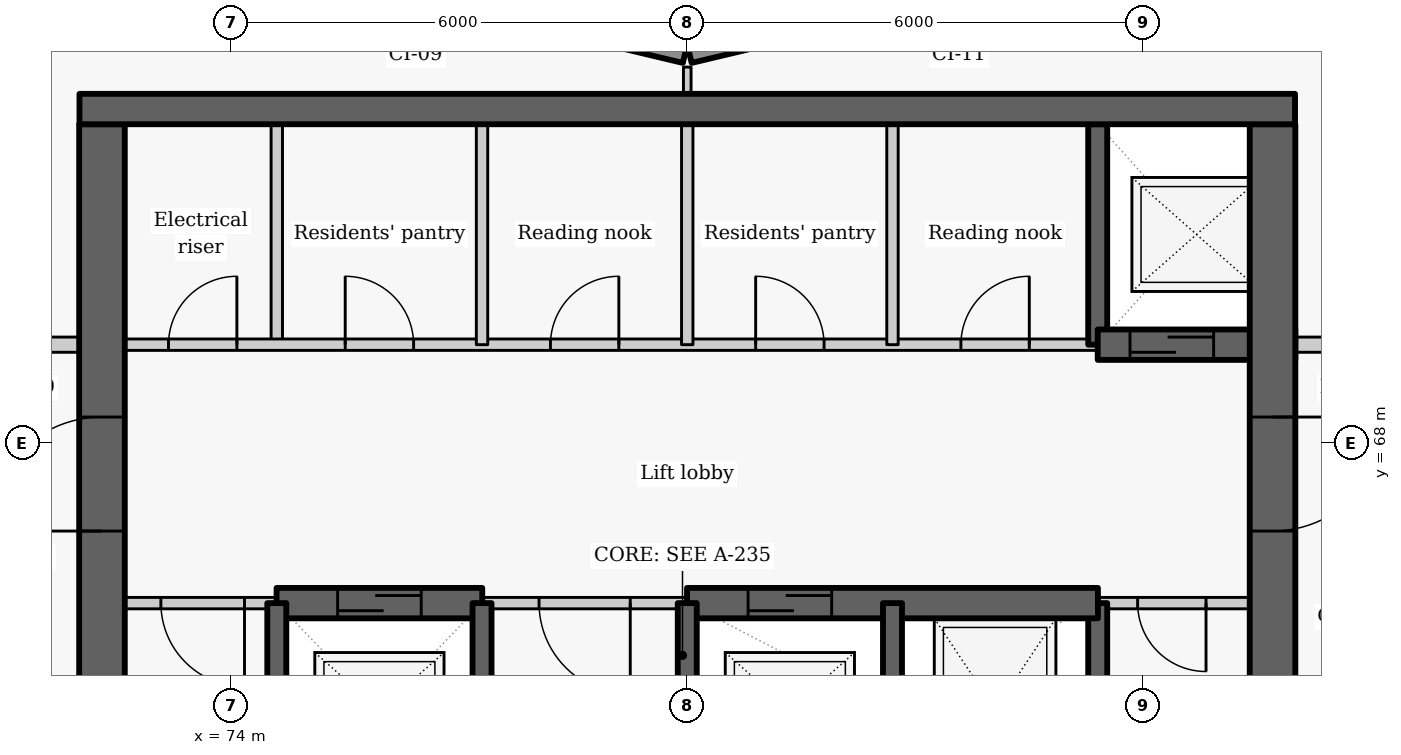
"""IFC4 building model, lengths in metres.
Left out: names, types, materials, properties, quantities, classifications, styles, units other than length and angle.
Written with IfcOpenShell. Run it as: python <this file> out.ifc"""

import sys

from ifc_helpers import new_model, si_unit, direction, frame, frame_2d, origin, place, context, subcontext, project, spatial, rectangle, extrude, element, fill, save


model = new_model("IFC4")
c1 = context("Model", 3, precision=1e-05, world=origin(), true_north=direction((0.0, 1.0)))
c2 = subcontext(c1, "Body", "Model", "MODEL_VIEW")
j1 = project(units=[si_unit("LENGTHUNIT", "METRE"), si_unit("PLANEANGLEUNIT", "RADIAN")], contexts=[c1])
p1 = place(None, origin())
s1 = spatial("IfcSite", under=j1, at=p1, CompositionType="ELEMENT")
p2 = place(p1, origin())
s2 = spatial("IfcBuilding", under=s1, at=p2, CompositionType="ELEMENT")
p3 = place(p2, frame((0.0, 0.0, 203.1)))
s3 = spatial("IfcBuildingStorey", under=s2, at=p3, CompositionType="ELEMENT", Elevation=203.1)
p4 = place(p3, frame((83.186, 73.881, 0.0), z_axis=(0.0, 0.0, 1.0), x_axis=(-0.972773113459, -0.231759508395, 0.0)))
e1 = element("IfcWall", 1, at=p4, inside=s3, PredefinedType="SOLIDWALL", context=c2, shape_type="SweptSolid", body=[
    extrude(rectangle(XDim=3.246, YDim=0.25, at=frame_2d((1.623, 0.0))), origin(), (0.0, 0.0, 1.0), 2.425),
])
p5 = place(p4, frame((0.573, 0.0, 0.9)))
e2 = element("IfcOpeningElement", 2, at=p5, cuts=e1, PredefinedType="OPENING", context=c2, shape_type="SweptSolid", body=[
    extrude(rectangle(XDim=2.1, YDim=1.1, at=frame_2d((1.05, 0.55))), frame((0.0, 0.135, 0.0), z_axis=(0.0, -1.0, 0.0), x_axis=(1.0, 0.0, 0.0)), (0.0, 0.0, 1.0), 0.27),
])
p6 = place(p3, frame((79.971, 73.128, 0.0), z_axis=(0.0, 0.0, 1.0), x_axis=(-0.972773113459, 0.231759508395, 0.0)))
e3 = element("IfcWall", 3, at=p6, inside=s3, PredefinedType="SOLIDWALL", context=c2, shape_type="SweptSolid", body=[
    extrude(rectangle(XDim=3.246, YDim=0.25, at=frame_2d((1.623, 0.0))), origin(), (0.0, 0.0, 1.0), 2.425),
])
p7 = place(p6, frame((0.573, 0.0, 0.9)))
e4 = element("IfcOpeningElement", 4, at=p7, cuts=e3, PredefinedType="OPENING", context=c2, shape_type="SweptSolid", body=[
    extrude(rectangle(XDim=2.1, YDim=1.1, at=frame_2d((1.05, 0.55))), frame((0.0, 0.135, 0.0), z_axis=(0.0, -1.0, 0.0), x_axis=(1.0, 0.0, 0.0)), (0.0, 0.0, 1.0), 0.27),
])
p8 = place(p3, frame((74.6, 69.3, 0.0), z_axis=(0.0, 0.0, 1.0), x_axis=(0.0, 1.0, 0.0)))
e5 = element("IfcWall", 5, at=p8, inside=s3, PredefinedType="PARTITIONING", context=c2, shape_type="SweptSolid", body=[
    extrude(rectangle(XDim=2.9, YDim=0.15, at=frame_2d((1.45, 0.0))), origin(), (0.0, 0.0, 1.0), 3.025),
])
p9 = place(p3, frame((72.0, 69.3, 0.0), z_axis=(0.0, 0.0, 1.0), x_axis=(1.0, 0.0, 0.0)))
e6 = element("IfcWall", 6, at=p9, inside=s3, PredefinedType="PARTITIONING", context=c2, shape_type="SweptSolid", body=[
    extrude(rectangle(XDim=13.4, YDim=0.15, at=frame_2d((6.7, 0.0))), origin(), (0.0, 0.0, 1.0), 3.025),
])
p10 = place(p9, frame((1.175, 0.0, 0.0)))
e7 = element("IfcOpeningElement", 7, at=p10, cuts=e6, PredefinedType="OPENING", context=c2, shape_type="SweptSolid", body=[
    extrude(rectangle(XDim=0.9, YDim=2.1, at=frame_2d((0.45, 1.05))), frame((0.0, 0.085, 0.0), z_axis=(0.0, -1.0, 0.0), x_axis=(1.0, 0.0, 0.0)), (0.0, 0.0, 1.0), 0.17),
])
p11 = place(p9, frame((3.5, 0.0, 0.0)))
e8 = element("IfcOpeningElement", 8, at=p11, cuts=e6, PredefinedType="OPENING", context=c2, shape_type="SweptSolid", body=[
    extrude(rectangle(XDim=0.9, YDim=2.1, at=frame_2d((0.45, 1.05))), frame((0.0, 0.085, 0.0), z_axis=(0.0, -1.0, 0.0), x_axis=(1.0, 0.0, 0.0)), (0.0, 0.0, 1.0), 0.17),
])
p12 = place(p9, frame((6.2, 0.0, 0.0)))
e9 = element("IfcOpeningElement", 9, at=p12, cuts=e6, PredefinedType="OPENING", context=c2, shape_type="SweptSolid", body=[
    extrude(rectangle(XDim=0.9, YDim=2.1, at=frame_2d((0.45, 1.05))), frame((0.0, 0.085, 0.0), z_axis=(0.0, -1.0, 0.0), x_axis=(1.0, 0.0, 0.0)), (0.0, 0.0, 1.0), 0.17),
])
p13 = place(p9, frame((8.9, 0.0, 0.0)))
e10 = element("IfcOpeningElement", 10, at=p13, cuts=e6, PredefinedType="OPENING", context=c2, shape_type="SweptSolid", body=[
    extrude(rectangle(XDim=0.9, YDim=2.1, at=frame_2d((0.45, 1.05))), frame((0.0, 0.085, 0.0), z_axis=(0.0, -1.0, 0.0), x_axis=(1.0, 0.0, 0.0)), (0.0, 0.0, 1.0), 0.17),
])
p14 = place(p9, frame((11.6, 0.0, 0.0)))
e11 = element("IfcOpeningElement", 11, at=p14, cuts=e6, PredefinedType="OPENING", context=c2, shape_type="SweptSolid", body=[
    extrude(rectangle(XDim=0.9, YDim=2.1, at=frame_2d((0.45, 1.05))), frame((0.0, 0.085, 0.0), z_axis=(0.0, -1.0, 0.0), x_axis=(1.0, 0.0, 0.0)), (0.0, 0.0, 1.0), 0.17),
])
p15 = place(p3, frame((72.3, 63.1, -0.275), z_axis=(0.0, 0.0, 1.0), x_axis=(0.0, 1.0, 0.0)))
e12 = element("IfcWall", 12, at=p15, inside=s3, PredefinedType="SHEAR", context=c2, shape_type="SweptSolid", body=[
    extrude(rectangle(XDim=9.1, YDim=0.6, at=frame_2d((4.55, 0.0))), origin(), (0.0, 0.0, 1.0), 3.3),
])
p16 = place(p15, frame((3.748, 0.0, 0.275)))
e13 = element("IfcOpeningElement", 13, at=p16, cuts=e12, PredefinedType="OPENING", context=c2, shape_type="SweptSolid", body=[
    extrude(rectangle(XDim=1.5, YDim=2.1, at=frame_2d((0.75, 1.05))), frame((0.0, 0.31, 0.0), z_axis=(0.0, -1.0, 0.0), x_axis=(1.0, 0.0, 0.0)), (0.0, 0.0, 1.0), 0.62),
])
p17 = place(p3, frame((85.4, 63.1, -0.275), z_axis=(0.0, 0.0, 1.0), x_axis=(0.0, 1.0, 0.0)))
e14 = element("IfcWall", 14, at=p17, inside=s3, PredefinedType="SHEAR", context=c2, shape_type="SweptSolid", body=[
    extrude(rectangle(XDim=2.8, YDim=0.25, at=frame_2d((1.4, 0.0))), origin(), (0.0, 0.0, 1.0), 3.3),
])
p18 = place(p3, frame((85.4, 69.3, -0.275), z_axis=(0.0, 0.0, 1.0), x_axis=(0.0, 1.0, 0.0)))
e15 = element("IfcWall", 15, at=p18, inside=s3, PredefinedType="SHEAR", context=c2, shape_type="SweptSolid", body=[
    extrude(rectangle(XDim=2.9, YDim=0.25, at=frame_2d((1.45, 0.0))), origin(), (0.0, 0.0, 1.0), 3.3),
])
p19 = place(p3, frame((85.4, 69.3, -0.275), z_axis=(0.0, 0.0, 1.0), x_axis=(1.0, 0.0, 0.0)))
e16 = element("IfcWall", 16, at=p19, inside=s3, PredefinedType="SHEAR", context=c2, shape_type="SweptSolid", body=[
    extrude(rectangle(XDim=2.6, YDim=0.4, at=frame_2d((1.3, 0.0))), origin(), (0.0, 0.0, 1.0), 3.3),
])
p20 = place(p19, frame((0.425, 0.0, 0.275)))
e17 = element("IfcOpeningElement", 17, at=p20, cuts=e16, PredefinedType="OPENING", context=c2, shape_type="SweptSolid", body=[
    extrude(rectangle(XDim=1.1, YDim=2.1, at=frame_2d((0.55, 1.05))), frame((0.0, 0.21, 0.0), z_axis=(0.0, -1.0, 0.0), x_axis=(1.0, 0.0, 0.0)), (0.0, 0.0, 1.0), 0.42),
])
p21 = place(p3, frame((87.7, 72.2, -0.275), z_axis=(0.0, 0.0, 1.0), x_axis=(0.0, -1.0, 0.0)))
e18 = element("IfcWall", 18, at=p21, inside=s3, PredefinedType="SHEAR", context=c2, shape_type="SweptSolid", body=[
    extrude(rectangle(XDim=14.25, YDim=0.6, at=frame_2d((7.125, 0.0))), origin(), (0.0, 0.0, 1.0), 3.3),
])
p22 = place(p21, frame((3.852, 0.0, 0.275)))
e19 = element("IfcOpeningElement", 19, at=p22, cuts=e18, PredefinedType="OPENING", context=c2, shape_type="SweptSolid", body=[
    extrude(rectangle(XDim=1.5, YDim=2.1, at=frame_2d((0.75, 1.05))), frame((0.0, 0.31, 0.0), z_axis=(0.0, -1.0, 0.0), x_axis=(1.0, 0.0, 0.0)), (0.0, 0.0, 1.0), 0.62),
])
for number, where, z_axis, x_axis in (
    (20, (77.3, 69.3, 0.0), (0.0, 0.0, 1.0), (0.0, 1.0, 0.0)),
    (21, (80.0, 69.3, 0.0), (0.0, 0.0, 1.0), (0.0, 1.0, 0.0)),
    (22, (82.7, 69.3, 0.0), (0.0, 0.0, 1.0), (0.0, 1.0, 0.0)),
):
    element("IfcWall", number, at=place(p3, frame(where, z_axis=z_axis, x_axis=x_axis)), inside=s3, PredefinedType="PARTITIONING", context=c2, shape_type="SweptSolid", body=[
        extrude(rectangle(XDim=2.9, YDim=0.15, at=frame_2d((1.45, 0.0))), origin(), (0.0, 0.0, 1.0), 3.025),
    ])
p23 = place(p3, frame((74.603, 65.9, 0.0), z_axis=(0.0, 0.0, 1.0), x_axis=(-1.0, 0.0, 0.0)))
e23 = element("IfcWall", 23, at=p23, inside=s3, PredefinedType="PARTITIONING", context=c2, shape_type="SweptSolid", body=[
    extrude(rectangle(XDim=2.603, YDim=0.15, at=frame_2d((1.302, 0.0))), origin(), (0.0, 0.0, 1.0), 3.025),
])
p24 = place(p23, frame((0.428, 0.0, 0.0)))
e24 = element("IfcOpeningElement", 24, at=p24, cuts=e23, PredefinedType="OPENING", context=c2, shape_type="SweptSolid", body=[
    extrude(rectangle(XDim=1.1, YDim=2.1, at=frame_2d((0.55, 1.05))), frame((0.0, 0.085, 0.0), z_axis=(0.0, -1.0, 0.0), x_axis=(1.0, 0.0, 0.0)), (0.0, 0.0, 1.0), 0.17),
])
p25 = place(p3, frame((80.003, 65.9, 0.0), z_axis=(0.0, 0.0, 1.0), x_axis=(-1.0, 0.0, 0.0)))
e25 = element("IfcWall", 25, at=p25, inside=s3, PredefinedType="PARTITIONING", context=c2, shape_type="SweptSolid", body=[
    extrude(rectangle(XDim=2.706, YDim=0.15, at=frame_2d((1.353, 0.0))), origin(), (0.0, 0.0, 1.0), 3.025),
])
p26 = place(p25, frame((0.753, 0.0, 0.0)))
e26 = element("IfcOpeningElement", 26, at=p26, cuts=e25, PredefinedType="OPENING", context=c2, shape_type="SweptSolid", body=[
    extrude(rectangle(XDim=1.2, YDim=2.1, at=frame_2d((0.6, 1.05))), frame((0.0, 0.085, 0.0), z_axis=(0.0, -1.0, 0.0), x_axis=(1.0, 0.0, 0.0)), (0.0, 0.0, 1.0), 0.17),
])
p27 = place(p3, frame((88.0, 65.9, 0.0), z_axis=(0.0, 0.0, 1.0), x_axis=(-1.0, 0.0, 0.0)))
e27 = element("IfcWall", 27, at=p27, inside=s3, PredefinedType="PARTITIONING", context=c2, shape_type="SweptSolid", body=[
    extrude(rectangle(XDim=2.603, YDim=0.15, at=frame_2d((1.302, 0.0))), origin(), (0.0, 0.0, 1.0), 3.025),
])
p28 = place(p27, frame((1.175, 0.0, 0.0)))
e28 = element("IfcOpeningElement", 28, at=p28, cuts=e27, PredefinedType="OPENING", context=c2, shape_type="SweptSolid", body=[
    extrude(rectangle(XDim=0.9, YDim=2.1, at=frame_2d((0.45, 1.05))), frame((0.0, 0.085, 0.0), z_axis=(0.0, -1.0, 0.0), x_axis=(1.0, 0.0, 0.0)), (0.0, 0.0, 1.0), 0.17),
])
p29 = place(p3, frame((74.597, 65.9, -0.275), z_axis=(0.0, 0.0, 1.0), x_axis=(1.0, 0.0, 0.0)))
e29 = element("IfcWall", 29, at=p29, inside=s3, PredefinedType="SHEAR", context=c2, shape_type="SweptSolid", body=[
    extrude(rectangle(XDim=2.706, YDim=0.4, at=frame_2d((1.353, 0.0))), origin(), (0.0, 0.0, 1.0), 3.3),
])
p30 = place(p29, frame((0.803, 0.0, 0.275)))
e30 = element("IfcOpeningElement", 30, at=p30, cuts=e29, PredefinedType="OPENING", context=c2, shape_type="SweptSolid", body=[
    extrude(rectangle(XDim=1.1, YDim=2.1, at=frame_2d((0.55, 1.05))), frame((0.0, 0.21, 0.0), z_axis=(0.0, -1.0, 0.0), x_axis=(1.0, 0.0, 0.0)), (0.0, 0.0, 1.0), 0.42),
])
p31 = place(p3, frame((79.997, 65.9, -0.275), z_axis=(0.0, 0.0, 1.0), x_axis=(1.0, 0.0, 0.0)))
e31 = element("IfcWall", 31, at=p31, inside=s3, PredefinedType="SHEAR", context=c2, shape_type="SweptSolid", body=[
    extrude(rectangle(XDim=5.406, YDim=0.4, at=frame_2d((2.703, 0.0))), origin(), (0.0, 0.0, 1.0), 3.3),
])
p32 = place(p31, frame((0.803, 0.0, 0.275)))
e32 = element("IfcOpeningElement", 32, at=p32, cuts=e31, PredefinedType="OPENING", context=c2, shape_type="SweptSolid", body=[
    extrude(rectangle(XDim=1.1, YDim=2.1, at=frame_2d((0.55, 1.05))), frame((0.0, 0.21, 0.0), z_axis=(0.0, -1.0, 0.0), x_axis=(1.0, 0.0, 0.0)), (0.0, 0.0, 1.0), 0.42),
])
for number, where, z_axis, x_axis in (
    (33, (74.6, 63.1, -0.275), (0.0, 0.0, 1.0), (0.0, 1.0, 0.0)),
    (34, (77.3, 63.1, -0.275), (0.0, 0.0, 1.0), (0.0, 1.0, 0.0)),
    (35, (80.0, 63.1, -0.275), (0.0, 0.0, 1.0), (0.0, 1.0, 0.0)),
    (36, (82.7, 63.1, -0.275), (0.0, 0.0, 1.0), (0.0, 1.0, 0.0)),
):
    element("IfcWall", number, at=place(p3, frame(where, z_axis=z_axis, x_axis=x_axis)), inside=s3, PredefinedType="SHEAR", context=c2, shape_type="SweptSolid", body=[
        extrude(rectangle(XDim=2.8, YDim=0.25, at=frame_2d((1.4, 0.0))), origin(), (0.0, 0.0, 1.0), 3.3),
    ])
for number, where, z_axis, x_axis in (
    (37, (70.45, 69.3, 0.0), (0.0, 0.0, 1.0), (1.0, 0.0, 0.0)),
    (38, (88.0, 69.3, 0.0), (0.0, 0.0, 1.0), (1.0, 0.0, 0.0)),
):
    element("IfcWall", number, at=place(p3, frame(where, z_axis=z_axis, x_axis=x_axis)), inside=s3, PredefinedType="PARTITIONING", context=c2, shape_type="SweptSolid", body=[
        extrude(rectangle(XDim=1.55, YDim=0.2, at=frame_2d((0.775, 0.0))), origin(), (0.0, 0.0, 1.0), 3.025),
    ])
p33 = place(p3, frame((80.0, 72.6, 0.0), z_axis=(0.0, 0.0, 1.0), x_axis=(0.0, 1.0, 0.0)))
e39 = element("IfcWall", 39, at=p33, inside=s3, PredefinedType="PARTITIONING", context=c2, shape_type="SweptSolid", body=[
    extrude(rectangle(XDim=0.352, YDim=0.1, at=frame_2d((0.176, 0.0))), origin(), (0.0, 0.0, 1.0), 3.025),
])
p34 = place(p3, frame((72.004, 72.4, -0.275), z_axis=(0.0, 0.0, 1.0), x_axis=(1.0, 0.0, 0.0)))
e40 = element("IfcWall", 40, at=p34, inside=s3, PredefinedType="SHEAR", context=c2, shape_type="SweptSolid", body=[
    extrude(rectangle(XDim=15.992, YDim=0.4, at=frame_2d((7.996, 0.0))), origin(), (0.0, 0.0, 1.0), 3.3),
])
p35 = place(p10, origin())
e41 = element("IfcDoor", 41, at=p35, inside=s3, OperationType="SINGLE_SWING_RIGHT", PredefinedType="DOOR", context=c2, shape_type="SweptSolid", body=[
    extrude(rectangle(XDim=0.9, YDim=2.1, at=frame_2d((0.45, 1.05))), frame((0.0, 0.025, 0.0), z_axis=(0.0, -1.0, 0.0), x_axis=(1.0, 0.0, 0.0)), (0.0, 0.0, 1.0), 0.05),
])
fill(e7, e41)
p36 = place(p20, origin())
e42 = element("IfcDoor", 42, at=p36, inside=s3, OperationType="SLIDING_TO_LEFT", PredefinedType="DOOR", context=c2, shape_type="SweptSolid", body=[
    extrude(rectangle(XDim=1.1, YDim=2.1, at=frame_2d((0.55, 1.05))), frame((0.0, 0.025, 0.0), z_axis=(0.0, -1.0, 0.0), x_axis=(1.0, 0.0, 0.0)), (0.0, 0.0, 1.0), 0.05),
])
fill(e17, e42)
p37 = place(p11, origin())
e43 = element("IfcDoor", 43, at=p37, inside=s3, OperationType="SINGLE_SWING_LEFT", PredefinedType="DOOR", context=c2, shape_type="SweptSolid", body=[
    extrude(rectangle(XDim=0.9, YDim=2.1, at=frame_2d((0.45, 1.05))), frame((0.0, 0.025, 0.0), z_axis=(0.0, -1.0, 0.0), x_axis=(1.0, 0.0, 0.0)), (0.0, 0.0, 1.0), 0.05),
])
fill(e8, e43)
p38 = place(p12, origin())
e44 = element("IfcDoor", 44, at=p38, inside=s3, OperationType="SINGLE_SWING_RIGHT", PredefinedType="DOOR", context=c2, shape_type="SweptSolid", body=[
    extrude(rectangle(XDim=0.9, YDim=2.1, at=frame_2d((0.45, 1.05))), frame((0.0, 0.025, 0.0), z_axis=(0.0, -1.0, 0.0), x_axis=(1.0, 0.0, 0.0)), (0.0, 0.0, 1.0), 0.05),
])
fill(e9, e44)
p39 = place(p13, origin())
e45 = element("IfcDoor", 45, at=p39, inside=s3, OperationType="SINGLE_SWING_LEFT", PredefinedType="DOOR", context=c2, shape_type="SweptSolid", body=[
    extrude(rectangle(XDim=0.9, YDim=2.1, at=frame_2d((0.45, 1.05))), frame((0.0, 0.025, 0.0), z_axis=(0.0, -1.0, 0.0), x_axis=(1.0, 0.0, 0.0)), (0.0, 0.0, 1.0), 0.05),
])
fill(e10, e45)
p40 = place(p14, origin())
e46 = element("IfcDoor", 46, at=p40, inside=s3, OperationType="SINGLE_SWING_RIGHT", PredefinedType="DOOR", context=c2, shape_type="SweptSolid", body=[
    extrude(rectangle(XDim=0.9, YDim=2.1, at=frame_2d((0.45, 1.05))), frame((0.0, 0.025, 0.0), z_axis=(0.0, -1.0, 0.0), x_axis=(1.0, 0.0, 0.0)), (0.0, 0.0, 1.0), 0.05),
])
fill(e11, e46)
p41 = place(p24, origin())
e47 = element("IfcDoor", 47, at=p41, inside=s3, OperationType="SINGLE_SWING_LEFT", PredefinedType="DOOR", context=c2, shape_type="SweptSolid", body=[
    extrude(rectangle(XDim=1.1, YDim=2.1, at=frame_2d((0.55, 1.05))), frame((0.0, 0.025, 0.0), z_axis=(0.0, -1.0, 0.0), x_axis=(1.0, 0.0, 0.0)), (0.0, 0.0, 1.0), 0.05),
])
fill(e24, e47)
p42 = place(p30, origin())
e48 = element("IfcDoor", 48, at=p42, inside=s3, OperationType="SLIDING_TO_LEFT", PredefinedType="DOOR", context=c2, shape_type="SweptSolid", body=[
    extrude(rectangle(XDim=1.1, YDim=2.1, at=frame_2d((0.55, 1.05))), frame((0.0, 0.025, 0.0), z_axis=(0.0, -1.0, 0.0), x_axis=(1.0, 0.0, 0.0)), (0.0, 0.0, 1.0), 0.05),
])
fill(e30, e48)
p43 = place(p26, origin())
e49 = element("IfcDoor", 49, at=p43, inside=s3, OperationType="DOUBLE_DOOR_SINGLE_SWING", PredefinedType="DOOR", context=c2, shape_type="SweptSolid", body=[
    extrude(rectangle(XDim=1.2, YDim=2.1, at=frame_2d((0.6, 1.05))), frame((0.0, 0.025, 0.0), z_axis=(0.0, -1.0, 0.0), x_axis=(1.0, 0.0, 0.0)), (0.0, 0.0, 1.0), 0.05),
])
fill(e26, e49)
p44 = place(p32, origin())
e50 = element("IfcDoor", 50, at=p44, inside=s3, OperationType="SLIDING_TO_LEFT", PredefinedType="DOOR", context=c2, shape_type="SweptSolid", body=[
    extrude(rectangle(XDim=1.1, YDim=2.1, at=frame_2d((0.55, 1.05))), frame((0.0, 0.025, 0.0), z_axis=(0.0, -1.0, 0.0), x_axis=(1.0, 0.0, 0.0)), (0.0, 0.0, 1.0), 0.05),
])
fill(e32, e50)
p45 = place(p28, origin())
e51 = element("IfcDoor", 51, at=p45, inside=s3, OperationType="SINGLE_SWING_LEFT", PredefinedType="DOOR", context=c2, shape_type="SweptSolid", body=[
    extrude(rectangle(XDim=0.9, YDim=2.1, at=frame_2d((0.45, 1.05))), frame((0.0, 0.025, 0.0), z_axis=(0.0, -1.0, 0.0), x_axis=(1.0, 0.0, 0.0)), (0.0, 0.0, 1.0), 0.05),
])
fill(e28, e51)
p46 = place(p22, origin())
e52 = element("IfcDoor", 52, at=p46, inside=s3, OperationType="DOUBLE_DOOR_SINGLE_SWING", PredefinedType="DOOR", context=c2, shape_type="SweptSolid", body=[
    extrude(rectangle(XDim=1.5, YDim=2.1, at=frame_2d((0.75, 1.05))), frame((0.0, 0.025, 0.0), z_axis=(0.0, -1.0, 0.0), x_axis=(1.0, 0.0, 0.0)), (0.0, 0.0, 1.0), 0.05),
])
fill(e19, e52)
p47 = place(p16, origin())
e53 = element("IfcDoor", 53, at=p47, inside=s3, OperationType="DOUBLE_DOOR_SINGLE_SWING", PredefinedType="DOOR", context=c2, shape_type="SweptSolid", body=[
    extrude(rectangle(XDim=1.5, YDim=2.1, at=frame_2d((0.75, 1.05))), frame((0.0, 0.025, 0.0), z_axis=(0.0, -1.0, 0.0), x_axis=(1.0, 0.0, 0.0)), (0.0, 0.0, 1.0), 0.05),
])
fill(e13, e53)
save(model, sys.argv[1])
